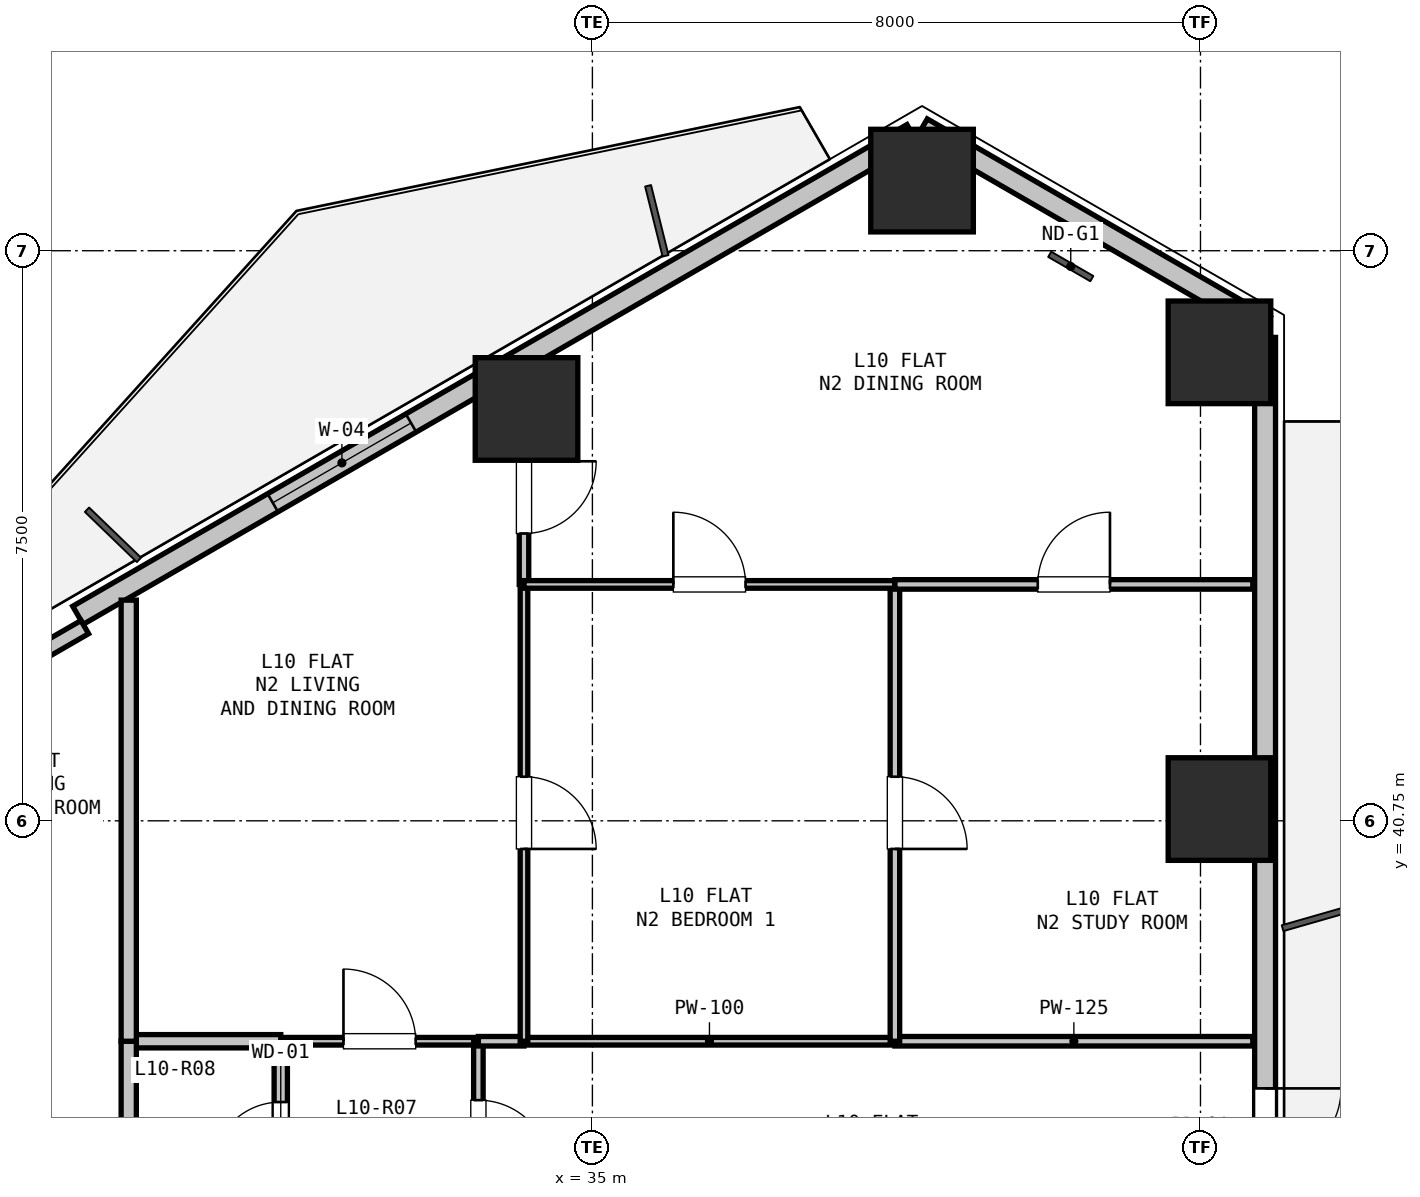
"""IFC4 building model, lengths in metres.
Left out: names, types, materials, properties, quantities, classifications, styles, units other than length and angle.
Written with IfcOpenShell. Run it as: python <this file> out.ifc"""

import sys

from ifc_helpers import new_model, si_unit, direction, frame, frame_2d, origin, origin_2d, place, context, subcontext, project, spatial, rectangle, hollow_rectangle, extrude, element, fill, save


model = new_model("IFC4")
c1 = context("Model", 3, precision=1e-05, world=origin(), true_north=direction((0.0, 1.0)))
c2 = subcontext(c1, "Body", "Model", "MODEL_VIEW")
j1 = project(units=[si_unit("LENGTHUNIT", "METRE"), si_unit("PLANEANGLEUNIT", "RADIAN")], contexts=[c1])
p1 = place(None, origin())
s1 = spatial("IfcSite", under=j1, at=p1, CompositionType="ELEMENT")
p2 = place(p1, origin())
s2 = spatial("IfcBuilding", under=s1, at=p2, CompositionType="ELEMENT")
p3 = place(p2, frame((0.0, 0.0, 39.0)))
s3 = spatial("IfcBuildingStorey", under=s2, at=p3, CompositionType="ELEMENT", Elevation=39.0)
for number, where, z_axis, x_axis in (
    (1, (34.133, 46.168, 0.0), (0.0, 0.0, 1.0), (1.0, 0.0, 0.0)),
    (2, (39.337, 49.173, 0.0), (0.0, 0.0, 1.0), (1.0, 0.0, 0.0)),
    (3, (43.25, 46.913, 0.0), (0.0, 0.0, 1.0), (1.0, 0.0, 0.0)),
    (4, (43.25, 40.905, 0.0), (0.0, 0.0, 1.0), (1.0, 0.0, 0.0)),
):
    element("IfcColumn", number, at=place(p3, frame(where, z_axis=z_axis, x_axis=x_axis)), inside=s3, PredefinedType="COLUMN", context=c2, shape_type="SweptSolid", body=[
        extrude(hollow_rectangle(XDim=1.35, YDim=1.35, WallThickness=0.036, at=origin_2d()), origin(), (0.0, 0.0, 1.0), 3.3),
    ])
p4 = place(p3, frame((39.337, 49.865, 0.0), z_axis=(0.0, 0.0, 1.0), x_axis=(0.866043601342, -0.499968479581, 0.0)))
e5 = element("IfcWall", 5, at=p4, inside=s3, PredefinedType="SOLIDWALL", context=c2, shape_type="SweptSolid", body=[
    extrude(rectangle(XDim=5.211, YDim=0.275, at=frame_2d((2.605, 0.0))), origin(), (0.0, 0.0, 1.0), 2.66),
])
p5 = place(p3, frame((28.232, 43.454, 0.0), z_axis=(0.0, 0.0, 1.0), x_axis=(0.86603192154, 0.499988710747, 0.0)))
e6 = element("IfcWall", 6, at=p5, inside=s3, PredefinedType="SOLIDWALL", context=c2, shape_type="SweptSolid", body=[
    extrude(rectangle(XDim=12.673, YDim=0.275, at=frame_2d((6.336, 0.0))), origin(), (0.0, 0.0, 1.0), 2.66),
])
p6 = place(p5, frame((2.96, 0.0, 0.9)))
e7 = element("IfcOpeningElement", 7, at=p6, cuts=e6, PredefinedType="OPENING", context=c2, shape_type="SweptSolid", body=[
    extrude(rectangle(XDim=2.1, YDim=1.6, at=frame_2d((1.05, 0.8))), frame((0.0, 0.147, 0.0), z_axis=(0.0, -1.0, 0.0), x_axis=(1.0, 0.0, 0.0)), (0.0, 0.0, 1.0), 0.295),
])
p7 = place(p3, frame((26.85, 42.448, 0.0), z_axis=(0.0, 0.0, 1.0), x_axis=(0.86605165483, 0.499954529098, 0.0)))
e8 = element("IfcWall", 8, at=p7, inside=s3, PredefinedType="PARAPET", context=c2, shape_type="SweptSolid", body=[
    extrude(rectangle(XDim=1.7, YDim=0.2, at=frame_2d((0.85, 0.0))), origin(), (0.0, 0.0, 1.0), 2.66),
])
p8 = place(p3, frame((43.85, 47.11, 0.0), z_axis=(0.0, 0.0, 1.0), x_axis=(0.0, -1.0, 0.0)))
e9 = element("IfcWall", 9, at=p8, inside=s3, PredefinedType="SOLIDWALL", context=c2, shape_type="SweptSolid", body=[
    extrude(rectangle(XDim=12.673, YDim=0.275, at=frame_2d((6.336, 0.0))), origin(), (0.0, 0.0, 1.0), 2.66),
])
p9 = place(p8, frame((9.88, 0.0, 0.0)))
e10 = element("IfcOpeningElement", 10, at=p9, cuts=e9, PredefinedType="OPENING", context=c2, shape_type="SweptSolid", body=[
    extrude(rectangle(XDim=1.0, YDim=2.1, at=frame_2d((0.5, 1.05))), frame((0.0, 0.147, 0.0), z_axis=(0.0, -1.0, 0.0), x_axis=(1.0, 0.0, 0.0)), (0.0, 0.0, 1.0), 0.295),
])
p10 = place(p3, frame((30.9, 37.85, 0.0), z_axis=(0.0, 0.0, 1.0), x_axis=(1.0, 0.0, 0.0)))
e11 = element("IfcWall", 11, at=p10, inside=s3, PredefinedType="PARTITIONING", context=c2, shape_type="SweptSolid", body=[
    extrude(rectangle(XDim=2.6, YDim=0.1, at=frame_2d((1.3, 0.0))), origin(), (0.0, 0.0, 1.0), 3.04),
])
p11 = place(p10, frame((0.825, 0.0, 0.0)))
e12 = element("IfcOpeningElement", 12, at=p11, cuts=e11, PredefinedType="OPENING", context=c2, shape_type="SweptSolid", body=[
    extrude(rectangle(XDim=0.95, YDim=2.1, at=frame_2d((0.475, 1.05))), frame((0.0, 0.06, 0.0), z_axis=(0.0, -1.0, 0.0), x_axis=(1.0, 0.0, 0.0)), (0.0, 0.0, 1.0), 0.12),
])
p12 = place(p3, frame((33.5, 37.85, 0.0), z_axis=(0.0, 0.0, 1.0), x_axis=(0.0, -1.0, 0.0)))
e13 = element("IfcWall", 13, at=p12, inside=s3, PredefinedType="PARTITIONING", context=c2, shape_type="SweptSolid", body=[
    extrude(rectangle(XDim=2.5, YDim=0.125, at=frame_2d((1.25, 0.0))), origin(), (0.0, 0.0, 1.0), 3.04),
])
p13 = place(p12, frame((0.775, 0.0, 0.0)))
e14 = element("IfcOpeningElement", 14, at=p13, cuts=e13, PredefinedType="OPENING", context=c2, shape_type="SweptSolid", body=[
    extrude(rectangle(XDim=0.95, YDim=2.1, at=frame_2d((0.475, 1.05))), frame((0.0, 0.073, 0.0), z_axis=(0.0, -1.0, 0.0), x_axis=(1.0, 0.0, 0.0)), (0.0, 0.0, 1.0), 0.145),
])
p14 = place(p3, frame((30.9, 35.35, 0.0), z_axis=(0.0, 0.0, 1.0), x_axis=(0.0, 1.0, 0.0)))
e15 = element("IfcWall", 15, at=p14, inside=s3, PredefinedType="PLUMBINGWALL", context=c2, shape_type="SweptSolid", body=[
    extrude(rectangle(XDim=2.5, YDim=0.175, at=frame_2d((1.25, 0.0))), origin(), (0.0, 0.0, 1.0), 3.04),
])
p15 = place(p14, frame((0.8, 0.0, 0.0)))
e16 = element("IfcOpeningElement", 16, at=p15, cuts=e15, PredefinedType="OPENING", context=c2, shape_type="SweptSolid", body=[
    extrude(rectangle(XDim=0.9, YDim=2.1, at=frame_2d((0.45, 1.05))), frame((0.0, 0.097, 0.0), z_axis=(0.0, -1.0, 0.0), x_axis=(1.0, 0.0, 0.0)), (0.0, 0.0, 1.0), 0.195),
])
p16 = place(p3, frame((28.9, 37.85, 0.0), z_axis=(0.0, 0.0, 1.0), x_axis=(1.0, 0.0, 0.0)))
e17 = element("IfcWall", 17, at=p16, inside=s3, PredefinedType="PLUMBINGWALL", context=c2, shape_type="SweptSolid", body=[
    extrude(rectangle(XDim=2.0, YDim=0.175, at=frame_2d((1.0, 0.0))), origin(), (0.0, 0.0, 1.0), 3.04),
])
p17 = place(p3, frame((28.9, 35.35, 0.0), z_axis=(0.0, 0.0, 1.0), x_axis=(0.0, 1.0, 0.0)))
e18 = element("IfcWall", 18, at=p17, inside=s3, PredefinedType="PARTITIONING", context=c2, shape_type="SweptSolid", body=[
    extrude(rectangle(XDim=2.5, YDim=0.2, at=frame_2d((1.25, 0.0))), origin(), (0.0, 0.0, 1.0), 3.04),
])
p18 = place(p3, frame((33.5, 37.85, 0.0), z_axis=(0.0, 0.0, 1.0), x_axis=(1.0, 0.0, 0.0)))
e19 = element("IfcWall", 19, at=p18, inside=s3, PredefinedType="PARTITIONING", context=c2, shape_type="SweptSolid", body=[
    extrude(rectangle(XDim=0.6, YDim=0.125, at=frame_2d((0.3, 0.0))), origin(), (0.0, 0.0, 1.0), 3.04),
])
p19 = place(p3, frame((34.1, 37.85, 0.0), z_axis=(0.0, 0.0, 1.0), x_axis=(1.0, 0.0, 0.0)))
e20 = element("IfcWall", 20, at=p19, inside=s3, PredefinedType="PARTITIONING", context=c2, shape_type="SweptSolid", body=[
    extrude(rectangle(XDim=4.88, YDim=0.1, at=frame_2d((2.44, 0.0))), origin(), (0.0, 0.0, 1.0), 2.337),
])
p20 = place(p3, frame((38.98, 37.85, 0.0), z_axis=(0.0, 0.0, 1.0), x_axis=(1.0, 0.0, 0.0)))
e21 = element("IfcWall", 21, at=p20, inside=s3, PredefinedType="PARTITIONING", context=c2, shape_type="SweptSolid", body=[
    extrude(rectangle(XDim=4.708, YDim=0.125, at=frame_2d((2.354, 0.0))), origin(), (0.0, 0.0, 1.0), 2.337),
])
p21 = place(p3, frame((28.9, 43.653, 0.0), z_axis=(0.0, 0.0, 1.0), x_axis=(0.0, -1.0, 0.0)))
e22 = element("IfcWall", 22, at=p21, inside=s3, PredefinedType="PARTITIONING", context=c2, shape_type="SweptSolid", body=[
    extrude(rectangle(XDim=5.803, YDim=0.2, at=frame_2d((2.901, 0.0))), origin(), (0.0, 0.0, 1.0), 2.365),
])
p22 = place(p3, frame((34.1, 46.655, 0.0), z_axis=(0.0, 0.0, 1.0), x_axis=(0.0, -1.0, 0.0)))
e23 = element("IfcWall", 23, at=p22, inside=s3, PredefinedType="PARTITIONING", context=c2, shape_type="SweptSolid", body=[
    extrude(rectangle(XDim=2.795, YDim=0.125, at=frame_2d((1.397, 0.0))), origin(), (0.0, 0.0, 1.0), 3.04),
])
p23 = place(p22, frame((1.175, 0.0, 0.0)))
e24 = element("IfcOpeningElement", 24, at=p23, cuts=e23, PredefinedType="OPENING", context=c2, shape_type="SweptSolid", body=[
    extrude(rectangle(XDim=0.95, YDim=2.1, at=frame_2d((0.475, 1.05))), frame((0.0, 0.073, 0.0), z_axis=(0.0, -1.0, 0.0), x_axis=(1.0, 0.0, 0.0)), (0.0, 0.0, 1.0), 0.145),
])
p24 = place(p3, frame((34.1, 43.86, 0.0), z_axis=(0.0, 0.0, 1.0), x_axis=(0.0, -1.0, 0.0)))
e25 = element("IfcWall", 25, at=p24, inside=s3, PredefinedType="PARTITIONING", context=c2, shape_type="SweptSolid", body=[
    extrude(rectangle(XDim=6.01, YDim=0.1, at=frame_2d((3.005, 0.0))), origin(), (0.0, 0.0, 1.0), 3.04),
])
p25 = place(p24, frame((2.53, 0.0, 0.0)))
e26 = element("IfcOpeningElement", 26, at=p25, cuts=e25, PredefinedType="OPENING", context=c2, shape_type="SweptSolid", body=[
    extrude(rectangle(XDim=0.95, YDim=2.1, at=frame_2d((0.475, 1.05))), frame((0.0, 0.06, 0.0), z_axis=(0.0, -1.0, 0.0), x_axis=(1.0, 0.0, 0.0)), (0.0, 0.0, 1.0), 0.12),
])
p26 = place(p3, frame((38.98, 43.86, 0.0), z_axis=(0.0, 0.0, 1.0), x_axis=(0.0, -1.0, 0.0)))
e27 = element("IfcWall", 27, at=p26, inside=s3, PredefinedType="PARTITIONING", context=c2, shape_type="SweptSolid", body=[
    extrude(rectangle(XDim=6.01, YDim=0.125, at=frame_2d((3.005, 0.0))), origin(), (0.0, 0.0, 1.0), 3.04),
])
p27 = place(p26, frame((2.53, 0.0, 0.0)))
e28 = element("IfcOpeningElement", 28, at=p27, cuts=e27, PredefinedType="OPENING", context=c2, shape_type="SweptSolid", body=[
    extrude(rectangle(XDim=0.95, YDim=2.1, at=frame_2d((0.475, 1.05))), frame((0.0, 0.073, 0.0), z_axis=(0.0, -1.0, 0.0), x_axis=(1.0, 0.0, 0.0)), (0.0, 0.0, 1.0), 0.145),
])
p28 = place(p3, frame((34.1, 43.86, 0.0), z_axis=(0.0, 0.0, 1.0), x_axis=(1.0, 0.0, 0.0)))
e29 = element("IfcWall", 29, at=p28, inside=s3, PredefinedType="PARTITIONING", context=c2, shape_type="SweptSolid", body=[
    extrude(rectangle(XDim=4.88, YDim=0.1, at=frame_2d((2.44, 0.0))), origin(), (0.0, 0.0, 1.0), 2.337),
])
p29 = place(p28, frame((1.965, 0.0, 0.0)))
e30 = element("IfcOpeningElement", 30, at=p29, cuts=e29, PredefinedType="OPENING", context=c2, shape_type="SweptSolid", body=[
    extrude(rectangle(XDim=0.95, YDim=2.1, at=frame_2d((0.475, 1.05))), frame((0.0, 0.06, 0.0), z_axis=(0.0, -1.0, 0.0), x_axis=(1.0, 0.0, 0.0)), (0.0, 0.0, 1.0), 0.12),
])
p30 = place(p3, frame((38.98, 43.86, 0.0), z_axis=(0.0, 0.0, 1.0), x_axis=(1.0, 0.0, 0.0)))
e31 = element("IfcWall", 31, at=p30, inside=s3, PredefinedType="PARTITIONING", context=c2, shape_type="SweptSolid", body=[
    extrude(rectangle(XDim=4.708, YDim=0.125, at=frame_2d((2.354, 0.0))), origin(), (0.0, 0.0, 1.0), 2.65),
])
p31 = place(p30, frame((1.879, 0.0, 0.0)))
e32 = element("IfcOpeningElement", 32, at=p31, cuts=e31, PredefinedType="OPENING", context=c2, shape_type="SweptSolid", body=[
    extrude(rectangle(XDim=0.95, YDim=2.1, at=frame_2d((0.475, 1.05))), frame((0.0, 0.073, 0.0), z_axis=(0.0, -1.0, 0.0), x_axis=(1.0, 0.0, 0.0)), (0.0, 0.0, 1.0), 0.145),
])
p32 = place(p6, origin())
e33 = element("IfcWindow", 33, at=p32, inside=s3, PartitioningType="SINGLE_PANEL", PredefinedType="WINDOW", context=c2, shape_type="SweptSolid", body=[
    extrude(rectangle(XDim=2.1, YDim=1.6, at=frame_2d((1.05, 0.8))), frame((0.0, 0.03, 0.0), z_axis=(0.0, -1.0, 0.0), x_axis=(1.0, 0.0, 0.0)), (0.0, 0.0, 1.0), 0.06),
])
fill(e7, e33)
p33 = place(p9, origin())
e34 = element("IfcDoor", 34, at=p33, inside=s3, OperationType="SINGLE_SWING_LEFT", PredefinedType="DOOR", context=c2, shape_type="SweptSolid", body=[
    extrude(rectangle(XDim=1.0, YDim=2.1, at=frame_2d((0.5, 1.05))), frame((0.0, 0.025, 0.0), z_axis=(0.0, -1.0, 0.0), x_axis=(1.0, 0.0, 0.0)), (0.0, 0.0, 1.0), 0.05),
])
fill(e10, e34)
p34 = place(p15, origin())
e35 = element("IfcDoor", 35, at=p34, inside=s3, OperationType="SINGLE_SWING_LEFT", PredefinedType="DOOR", context=c2, shape_type="SweptSolid", body=[
    extrude(rectangle(XDim=0.9, YDim=2.1, at=frame_2d((0.45, 1.05))), frame((0.0, 0.025, 0.0), z_axis=(0.0, -1.0, 0.0), x_axis=(1.0, 0.0, 0.0)), (0.0, 0.0, 1.0), 0.05),
])
fill(e16, e35)
p35 = place(p13, origin())
e36 = element("IfcDoor", 36, at=p35, inside=s3, OperationType="SINGLE_SWING_RIGHT", PredefinedType="DOOR", context=c2, shape_type="SweptSolid", body=[
    extrude(rectangle(XDim=0.95, YDim=2.1, at=frame_2d((0.475, 1.05))), frame((0.0, 0.025, 0.0), z_axis=(0.0, -1.0, 0.0), x_axis=(1.0, 0.0, 0.0)), (0.0, 0.0, 1.0), 0.05),
])
fill(e14, e36)
p36 = place(p11, origin())
e37 = element("IfcDoor", 37, at=p36, inside=s3, OperationType="SINGLE_SWING_LEFT", PredefinedType="DOOR", context=c2, shape_type="SweptSolid", body=[
    extrude(rectangle(XDim=0.95, YDim=2.1, at=frame_2d((0.475, 1.05))), frame((0.0, 0.025, 0.0), z_axis=(0.0, -1.0, 0.0), x_axis=(1.0, 0.0, 0.0)), (0.0, 0.0, 1.0), 0.05),
])
fill(e12, e37)
p37 = place(p25, origin())
e38 = element("IfcDoor", 38, at=p37, inside=s3, OperationType="SINGLE_SWING_RIGHT", PredefinedType="DOOR", context=c2, shape_type="SweptSolid", body=[
    extrude(rectangle(XDim=0.95, YDim=2.1, at=frame_2d((0.475, 1.05))), frame((0.0, 0.025, 0.0), z_axis=(0.0, -1.0, 0.0), x_axis=(1.0, 0.0, 0.0)), (0.0, 0.0, 1.0), 0.05),
])
fill(e26, e38)
p38 = place(p23, origin())
e39 = element("IfcDoor", 39, at=p38, inside=s3, OperationType="SINGLE_SWING_LEFT", PredefinedType="DOOR", context=c2, shape_type="SweptSolid", body=[
    extrude(rectangle(XDim=0.95, YDim=2.1, at=frame_2d((0.475, 1.05))), frame((0.0, 0.025, 0.0), z_axis=(0.0, -1.0, 0.0), x_axis=(1.0, 0.0, 0.0)), (0.0, 0.0, 1.0), 0.05),
])
fill(e24, e39)
p39 = place(p27, origin())
e40 = element("IfcDoor", 40, at=p39, inside=s3, OperationType="SINGLE_SWING_RIGHT", PredefinedType="DOOR", context=c2, shape_type="SweptSolid", body=[
    extrude(rectangle(XDim=0.95, YDim=2.1, at=frame_2d((0.475, 1.05))), frame((0.0, 0.025, 0.0), z_axis=(0.0, -1.0, 0.0), x_axis=(1.0, 0.0, 0.0)), (0.0, 0.0, 1.0), 0.05),
])
fill(e28, e40)
p40 = place(p29, origin())
e41 = element("IfcDoor", 41, at=p40, inside=s3, OperationType="SINGLE_SWING_LEFT", PredefinedType="DOOR", context=c2, shape_type="SweptSolid", body=[
    extrude(rectangle(XDim=0.95, YDim=2.1, at=frame_2d((0.475, 1.05))), frame((0.0, 0.025, 0.0), z_axis=(0.0, -1.0, 0.0), x_axis=(1.0, 0.0, 0.0)), (0.0, 0.0, 1.0), 0.05),
])
fill(e30, e41)
p41 = place(p31, origin())
e42 = element("IfcDoor", 42, at=p41, inside=s3, OperationType="SINGLE_SWING_RIGHT", PredefinedType="DOOR", context=c2, shape_type="SweptSolid", body=[
    extrude(rectangle(XDim=0.95, YDim=2.1, at=frame_2d((0.475, 1.05))), frame((0.0, 0.025, 0.0), z_axis=(0.0, -1.0, 0.0), x_axis=(1.0, 0.0, 0.0)), (0.0, 0.0, 1.0), 0.05),
])
fill(e32, e42)
save(model, sys.argv[1])
